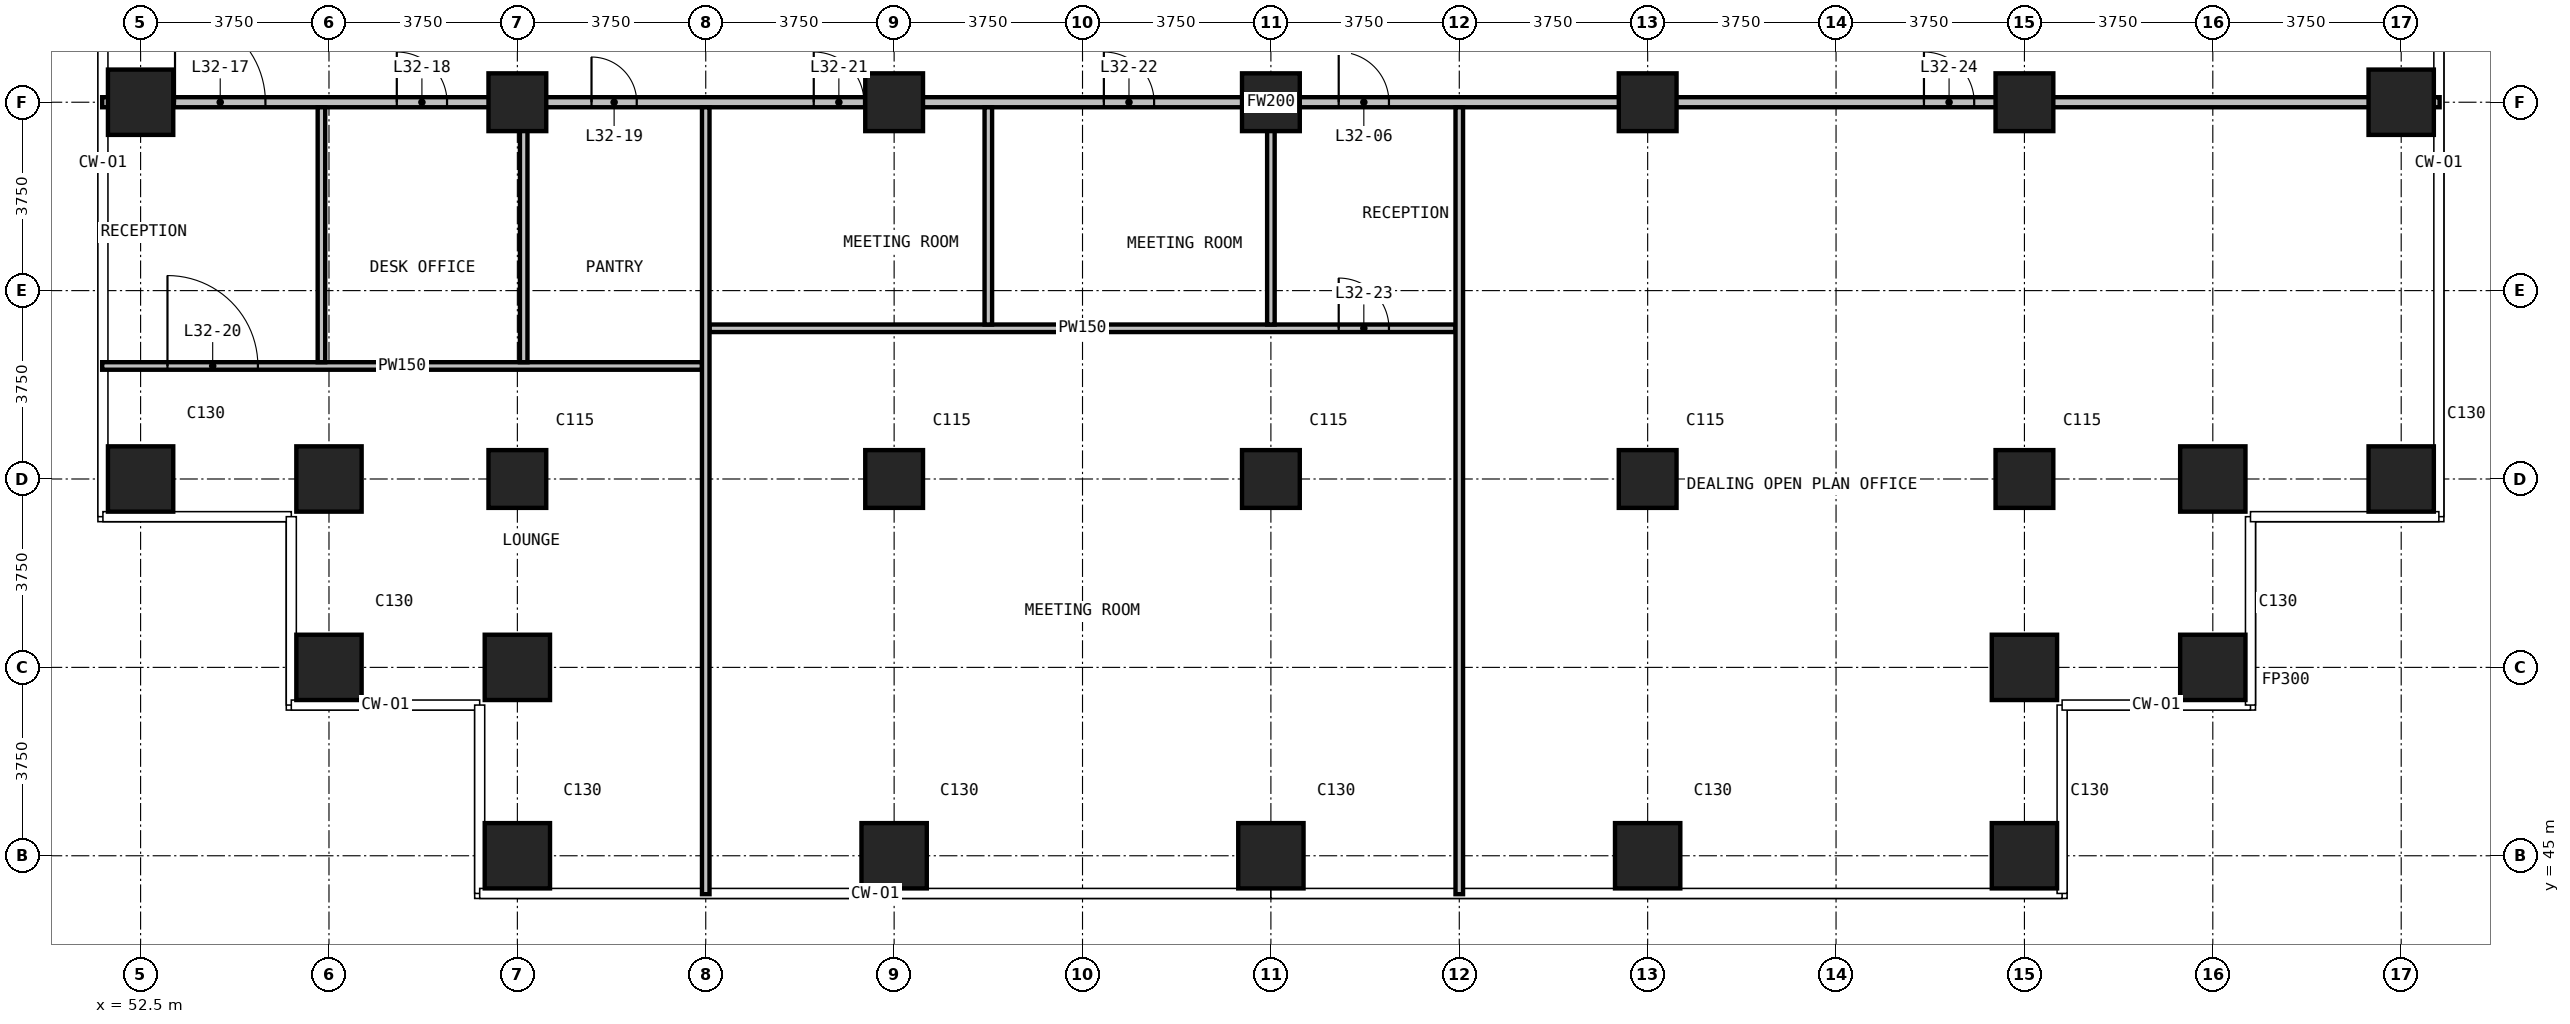
"""IFC4 building model, lengths in metres.
Left out: names, types, materials, properties, quantities, classifications, styles, units other than length and angle.
Written with IfcOpenShell. Run it as: python <this file> out.ifc"""

import sys

from ifc_helpers import new_model, si_unit, direction, frame, frame_2d, origin, origin_2d, place, context, subcontext, project, spatial, rectangle, extrude, element, fill, save


model = new_model("IFC4")
c1 = context("Model", 3, precision=1e-05, world=origin(), true_north=direction((0.0, 1.0)))
c2 = subcontext(c1, "Body", "Model", "MODEL_VIEW")
j1 = project(units=[si_unit("LENGTHUNIT", "METRE"), si_unit("PLANEANGLEUNIT", "RADIAN")], contexts=[c1])
p1 = place(None, origin())
s1 = spatial("IfcSite", under=j1, at=p1, CompositionType="ELEMENT")
p2 = place(p1, origin())
s2 = spatial("IfcBuilding", under=s1, at=p2, CompositionType="ELEMENT")
p3 = place(p2, frame((0.0, 0.0, 128.8)))
s3 = spatial("IfcBuildingStorey", under=s2, at=p3, CompositionType="ELEMENT", Elevation=128.8)
for number, where, z_axis, x_axis in (
    (1, (52.5, 52.5, 0.0), (0.0, 0.0, 1.0), (1.0, 0.0, 0.0)),
    (2, (52.5, 60.0, 0.0), (0.0, 0.0, 1.0), (1.0, 0.0, 0.0)),
    (3, (56.25, 48.75, 0.0), (0.0, 0.0, 1.0), (1.0, 0.0, 0.0)),
    (4, (56.25, 52.5, 0.0), (0.0, 0.0, 1.0), (1.0, 0.0, 0.0)),
    (5, (60.0, 45.0, 0.0), (0.0, 0.0, 1.0), (1.0, 0.0, 0.0)),
    (6, (60.0, 48.75, 0.0), (0.0, 0.0, 1.0), (1.0, 0.0, 0.0)),
):
    element("IfcColumn", number, at=place(p3, frame(where, z_axis=z_axis, x_axis=x_axis)), inside=s3, PredefinedType="COLUMN", context=c2, shape_type="SweptSolid", body=[
        extrude(rectangle(XDim=1.3, YDim=1.3, at=origin_2d()), origin(), (0.0, 0.0, 1.0), 3.6),
    ])
for number, where, z_axis, x_axis in (
    (7, (60.0, 52.5, 0.0), (0.0, 0.0, 1.0), (1.0, 0.0, 0.0)),
    (8, (60.0, 60.0, 0.0), (0.0, 0.0, 1.0), (1.0, 0.0, 0.0)),
):
    element("IfcColumn", number, at=place(p3, frame(where, z_axis=z_axis, x_axis=x_axis)), inside=s3, PredefinedType="COLUMN", context=c2, shape_type="SweptSolid", body=[
        extrude(rectangle(XDim=1.15, YDim=1.15, at=origin_2d()), origin(), (0.0, 0.0, 1.0), 3.6),
    ])
p4 = place(p3, frame((67.5, 45.0, 0.0), z_axis=(0.0, 0.0, 1.0), x_axis=(1.0, 0.0, 0.0)))
e9 = element("IfcColumn", 9, at=p4, inside=s3, PredefinedType="COLUMN", context=c2, shape_type="SweptSolid", body=[
    extrude(rectangle(XDim=1.3, YDim=1.3, at=origin_2d()), origin(), (0.0, 0.0, 1.0), 3.6),
])
for number, where, z_axis, x_axis in (
    (10, (67.5, 52.5, 0.0), (0.0, 0.0, 1.0), (1.0, 0.0, 0.0)),
    (11, (67.5, 60.0, 0.0), (0.0, 0.0, 1.0), (1.0, 0.0, 0.0)),
):
    element("IfcColumn", number, at=place(p3, frame(where, z_axis=z_axis, x_axis=x_axis)), inside=s3, PredefinedType="COLUMN", context=c2, shape_type="SweptSolid", body=[
        extrude(rectangle(XDim=1.15, YDim=1.15, at=origin_2d()), origin(), (0.0, 0.0, 1.0), 3.6),
    ])
p5 = place(p3, frame((75.0, 45.0, 0.0), z_axis=(0.0, 0.0, 1.0), x_axis=(1.0, 0.0, 0.0)))
e12 = element("IfcColumn", 12, at=p5, inside=s3, PredefinedType="COLUMN", context=c2, shape_type="SweptSolid", body=[
    extrude(rectangle(XDim=1.3, YDim=1.3, at=origin_2d()), origin(), (0.0, 0.0, 1.0), 3.6),
])
for number, where, z_axis, x_axis in (
    (13, (75.0, 52.5, 0.0), (0.0, 0.0, 1.0), (1.0, 0.0, 0.0)),
    (14, (75.0, 60.0, 0.0), (0.0, 0.0, 1.0), (1.0, 0.0, 0.0)),
):
    element("IfcColumn", number, at=place(p3, frame(where, z_axis=z_axis, x_axis=x_axis)), inside=s3, PredefinedType="COLUMN", context=c2, shape_type="SweptSolid", body=[
        extrude(rectangle(XDim=1.15, YDim=1.15, at=origin_2d()), origin(), (0.0, 0.0, 1.0), 3.6),
    ])
p6 = place(p3, frame((82.5, 45.0, 0.0), z_axis=(0.0, 0.0, 1.0), x_axis=(1.0, 0.0, 0.0)))
e15 = element("IfcColumn", 15, at=p6, inside=s3, PredefinedType="COLUMN", context=c2, shape_type="SweptSolid", body=[
    extrude(rectangle(XDim=1.3, YDim=1.3, at=origin_2d()), origin(), (0.0, 0.0, 1.0), 3.6),
])
for number, where, z_axis, x_axis in (
    (16, (82.5, 52.5, 0.0), (0.0, 0.0, 1.0), (1.0, 0.0, 0.0)),
    (17, (82.5, 60.0, 0.0), (0.0, 0.0, 1.0), (1.0, 0.0, 0.0)),
):
    element("IfcColumn", number, at=place(p3, frame(where, z_axis=z_axis, x_axis=x_axis)), inside=s3, PredefinedType="COLUMN", context=c2, shape_type="SweptSolid", body=[
        extrude(rectangle(XDim=1.15, YDim=1.15, at=origin_2d()), origin(), (0.0, 0.0, 1.0), 3.6),
    ])
for number, where, z_axis, x_axis in (
    (18, (90.0, 45.0, 0.0), (0.0, 0.0, 1.0), (1.0, 0.0, 0.0)),
    (19, (90.0, 48.75, 0.0), (0.0, 0.0, 1.0), (1.0, 0.0, 0.0)),
):
    element("IfcColumn", number, at=place(p3, frame(where, z_axis=z_axis, x_axis=x_axis)), inside=s3, PredefinedType="COLUMN", context=c2, shape_type="SweptSolid", body=[
        extrude(rectangle(XDim=1.3, YDim=1.3, at=origin_2d()), origin(), (0.0, 0.0, 1.0), 3.6),
    ])
for number, where, z_axis, x_axis in (
    (20, (90.0, 52.5, 0.0), (0.0, 0.0, 1.0), (1.0, 0.0, 0.0)),
    (21, (90.0, 60.0, 0.0), (0.0, 0.0, 1.0), (1.0, 0.0, 0.0)),
):
    element("IfcColumn", number, at=place(p3, frame(where, z_axis=z_axis, x_axis=x_axis)), inside=s3, PredefinedType="COLUMN", context=c2, shape_type="SweptSolid", body=[
        extrude(rectangle(XDim=1.15, YDim=1.15, at=origin_2d()), origin(), (0.0, 0.0, 1.0), 3.6),
    ])
for number, where, z_axis, x_axis in (
    (22, (93.75, 48.75, 0.0), (0.0, 0.0, 1.0), (1.0, 0.0, 0.0)),
    (23, (93.75, 52.5, 0.0), (0.0, 0.0, 1.0), (1.0, 0.0, 0.0)),
    (24, (97.5, 52.5, 0.0), (0.0, 0.0, 1.0), (1.0, 0.0, 0.0)),
    (25, (97.5, 60.0, 0.0), (0.0, 0.0, 1.0), (1.0, 0.0, 0.0)),
):
    element("IfcColumn", number, at=place(p3, frame(where, z_axis=z_axis, x_axis=x_axis)), inside=s3, PredefinedType="COLUMN", context=c2, shape_type="SweptSolid", body=[
        extrude(rectangle(XDim=1.3, YDim=1.3, at=origin_2d()), origin(), (0.0, 0.0, 1.0), 3.6),
    ])
p7 = place(p3, frame((51.735, 60.0, 0.0), z_axis=(0.0, 0.0, 1.0), x_axis=(1.0, 0.0, 0.0)))
e26 = element("IfcWall", 26, at=p7, inside=s3, PredefinedType="PARTITIONING", context=c2, shape_type="SweptSolid", body=[
    extrude(rectangle(XDim=46.53, YDim=0.2, at=frame_2d((23.265, 0.0))), origin(), (0.0, 0.0, 1.0), 3.3),
])
p8 = place(p7, frame((24.615, 0.0, 0.0)))
e27 = element("IfcOpeningElement", 27, at=p8, cuts=e26, PredefinedType="OPENING", context=c2, shape_type="SweptSolid", body=[
    extrude(rectangle(XDim=1.0, YDim=2.2, at=frame_2d((0.5, 1.1))), frame((0.0, 0.11, 0.0), z_axis=(0.0, -1.0, 0.0), x_axis=(1.0, 0.0, 0.0)), (0.0, 0.0, 1.0), 0.22),
])
p9 = place(p7, frame((1.45, 0.0, 0.0)))
e28 = element("IfcOpeningElement", 28, at=p9, cuts=e26, PredefinedType="OPENING", context=c2, shape_type="SweptSolid", body=[
    extrude(rectangle(XDim=1.8, YDim=2.2, at=frame_2d((0.9, 1.1))), frame((0.0, 0.11, 0.0), z_axis=(0.0, -1.0, 0.0), x_axis=(1.0, 0.0, 0.0)), (0.0, 0.0, 1.0), 0.22),
])
p10 = place(p7, frame((5.865, 0.0, 0.0)))
e29 = element("IfcOpeningElement", 29, at=p10, cuts=e26, PredefinedType="OPENING", context=c2, shape_type="SweptSolid", body=[
    extrude(rectangle(XDim=1.0, YDim=2.2, at=frame_2d((0.5, 1.1))), frame((0.0, 0.11, 0.0), z_axis=(0.0, -1.0, 0.0), x_axis=(1.0, 0.0, 0.0)), (0.0, 0.0, 1.0), 0.22),
])
p11 = place(p7, frame((9.741, 0.0, 0.0)))
e30 = element("IfcOpeningElement", 30, at=p11, cuts=e26, PredefinedType="OPENING", context=c2, shape_type="SweptSolid", body=[
    extrude(rectangle(XDim=0.9, YDim=2.2, at=frame_2d((0.45, 1.1))), frame((0.0, 0.11, 0.0), z_axis=(0.0, -1.0, 0.0), x_axis=(1.0, 0.0, 0.0)), (0.0, 0.0, 1.0), 0.22),
])
p12 = place(p7, frame((14.165, 0.0, 0.0)))
e31 = element("IfcOpeningElement", 31, at=p12, cuts=e26, PredefinedType="OPENING", context=c2, shape_type="SweptSolid", body=[
    extrude(rectangle(XDim=1.0, YDim=2.2, at=frame_2d((0.5, 1.1))), frame((0.0, 0.11, 0.0), z_axis=(0.0, -1.0, 0.0), x_axis=(1.0, 0.0, 0.0)), (0.0, 0.0, 1.0), 0.22),
])
p13 = place(p7, frame((19.94, 0.0, 0.0)))
e32 = element("IfcOpeningElement", 32, at=p13, cuts=e26, PredefinedType="OPENING", context=c2, shape_type="SweptSolid", body=[
    extrude(rectangle(XDim=1.0, YDim=2.2, at=frame_2d((0.5, 1.1))), frame((0.0, 0.11, 0.0), z_axis=(0.0, -1.0, 0.0), x_axis=(1.0, 0.0, 0.0)), (0.0, 0.0, 1.0), 0.22),
])
p14 = place(p7, frame((36.265, 0.0, 0.0)))
e33 = element("IfcOpeningElement", 33, at=p14, cuts=e26, PredefinedType="OPENING", context=c2, shape_type="SweptSolid", body=[
    extrude(rectangle(XDim=1.0, YDim=2.2, at=frame_2d((0.5, 1.1))), frame((0.0, 0.11, 0.0), z_axis=(0.0, -1.0, 0.0), x_axis=(1.0, 0.0, 0.0)), (0.0, 0.0, 1.0), 0.22),
])
p15 = place(p3, frame((51.735, 54.75, 0.0), z_axis=(0.0, 0.0, 1.0), x_axis=(1.0, 0.0, 0.0)))
e34 = element("IfcWall", 34, at=p15, inside=s3, PredefinedType="PARTITIONING", context=c2, shape_type="SweptSolid", body=[
    extrude(rectangle(XDim=11.94, YDim=0.15, at=frame_2d((5.97, 0.0))), origin(), (0.0, 0.0, 1.0), 3.3),
])
p16 = place(p15, frame((1.3, 0.0, 0.0)))
e35 = element("IfcOpeningElement", 35, at=p16, cuts=e34, PredefinedType="OPENING", context=c2, shape_type="SweptSolid", body=[
    extrude(rectangle(XDim=1.8, YDim=2.2, at=frame_2d((0.9, 1.1))), frame((0.0, 0.085, 0.0), z_axis=(0.0, -1.0, 0.0), x_axis=(1.0, 0.0, 0.0)), (0.0, 0.0, 1.0), 0.17),
])
p17 = place(p3, frame((63.825, 55.5, 0.0), z_axis=(0.0, 0.0, 1.0), x_axis=(1.0, 0.0, 0.0)))
e36 = element("IfcWall", 36, at=p17, inside=s3, PredefinedType="PARTITIONING", context=c2, shape_type="SweptSolid", body=[
    extrude(rectangle(XDim=14.85, YDim=0.15, at=frame_2d((7.425, 0.0))), origin(), (0.0, 0.0, 1.0), 3.3),
])
p18 = place(p17, frame((12.525, 0.0, 0.0)))
e37 = element("IfcOpeningElement", 37, at=p18, cuts=e36, PredefinedType="OPENING", context=c2, shape_type="SweptSolid", body=[
    extrude(rectangle(XDim=1.0, YDim=2.2, at=frame_2d((0.5, 1.1))), frame((0.0, 0.085, 0.0), z_axis=(0.0, -1.0, 0.0), x_axis=(1.0, 0.0, 0.0)), (0.0, 0.0, 1.0), 0.17),
])
for number, where, z_axis, x_axis in (
    (38, (56.1, 54.825, 0.0), (0.0, 0.0, 1.0), (0.0, 1.0, 0.0)),
    (39, (60.126, 54.825, 0.0), (0.0, 0.0, 1.0), (0.0, 1.0, 0.0)),
):
    element("IfcWall", number, at=place(p3, frame(where, z_axis=z_axis, x_axis=x_axis)), inside=s3, PredefinedType="PARTITIONING", context=c2, shape_type="SweptSolid", body=[
        extrude(rectangle(XDim=5.075, YDim=0.15, at=frame_2d((2.538, 0.0))), origin(), (0.0, 0.0, 1.0), 3.3),
    ])
p19 = place(p3, frame((63.75, 44.235, 0.0), z_axis=(0.0, 0.0, 1.0), x_axis=(0.0, 1.0, 0.0)))
e40 = element("IfcWall", 40, at=p19, inside=s3, PredefinedType="PARTITIONING", context=c2, shape_type="SweptSolid", body=[
    extrude(rectangle(XDim=15.665, YDim=0.15, at=frame_2d((7.833, 0.0))), origin(), (0.0, 0.0, 1.0), 3.3),
])
for number, where, z_axis, x_axis in (
    (41, (69.375, 55.575, 0.0), (0.0, 0.0, 1.0), (0.0, 1.0, 0.0)),
    (42, (75.0, 55.575, 0.0), (0.0, 0.0, 1.0), (0.0, 1.0, 0.0)),
):
    element("IfcWall", number, at=place(p3, frame(where, z_axis=z_axis, x_axis=x_axis)), inside=s3, PredefinedType="PARTITIONING", context=c2, shape_type="SweptSolid", body=[
        extrude(rectangle(XDim=4.325, YDim=0.15, at=frame_2d((2.163, 0.0))), origin(), (0.0, 0.0, 1.0), 3.3),
    ])
p20 = place(p3, frame((78.75, 44.235, 0.0), z_axis=(0.0, 0.0, 1.0), x_axis=(0.0, 1.0, 0.0)))
e43 = element("IfcWall", 43, at=p20, inside=s3, PredefinedType="PARTITIONING", context=c2, shape_type="SweptSolid", body=[
    extrude(rectangle(XDim=15.665, YDim=0.15, at=frame_2d((7.833, 0.0))), origin(), (0.0, 0.0, 1.0), 3.3),
])
p21 = place(p8, origin())
e44 = element("IfcDoor", 44, at=p21, inside=s3, OperationType="SINGLE_SWING_RIGHT", PredefinedType="DOOR", context=c2, shape_type="SweptSolid", body=[
    extrude(rectangle(XDim=1.0, YDim=2.2, at=frame_2d((0.5, 1.1))), frame((0.0, 0.025, 0.0), z_axis=(0.0, -1.0, 0.0), x_axis=(1.0, 0.0, 0.0)), (0.0, 0.0, 1.0), 0.05),
])
fill(e27, e44)
p22 = place(p9, origin())
e45 = element("IfcDoor", 45, at=p22, inside=s3, OperationType="DOUBLE_DOOR_SINGLE_SWING", PredefinedType="DOOR", context=c2, shape_type="SweptSolid", body=[
    extrude(rectangle(XDim=1.8, YDim=2.2, at=frame_2d((0.9, 1.1))), frame((0.0, 0.025, 0.0), z_axis=(0.0, -1.0, 0.0), x_axis=(1.0, 0.0, 0.0)), (0.0, 0.0, 1.0), 0.05),
])
fill(e28, e45)
p23 = place(p10, origin())
e46 = element("IfcDoor", 46, at=p23, inside=s3, OperationType="SINGLE_SWING_LEFT", PredefinedType="DOOR", context=c2, shape_type="SweptSolid", body=[
    extrude(rectangle(XDim=1.0, YDim=2.2, at=frame_2d((0.5, 1.1))), frame((0.0, 0.025, 0.0), z_axis=(0.0, -1.0, 0.0), x_axis=(1.0, 0.0, 0.0)), (0.0, 0.0, 1.0), 0.05),
])
fill(e29, e46)
p24 = place(p11, origin())
e47 = element("IfcDoor", 47, at=p24, inside=s3, OperationType="SINGLE_SWING_LEFT", PredefinedType="DOOR", context=c2, shape_type="SweptSolid", body=[
    extrude(rectangle(XDim=0.9, YDim=2.2, at=frame_2d((0.45, 1.1))), frame((0.0, 0.025, 0.0), z_axis=(0.0, -1.0, 0.0), x_axis=(1.0, 0.0, 0.0)), (0.0, 0.0, 1.0), 0.05),
])
fill(e30, e47)
p25 = place(p16, origin())
e48 = element("IfcDoor", 48, at=p25, inside=s3, OperationType="DOUBLE_DOOR_SINGLE_SWING", PredefinedType="DOOR", context=c2, shape_type="SweptSolid", body=[
    extrude(rectangle(XDim=1.8, YDim=2.2, at=frame_2d((0.9, 1.1))), frame((0.0, 0.025, 0.0), z_axis=(0.0, -1.0, 0.0), x_axis=(1.0, 0.0, 0.0)), (0.0, 0.0, 1.0), 0.05),
])
fill(e35, e48)
p26 = place(p12, origin())
e49 = element("IfcDoor", 49, at=p26, inside=s3, OperationType="SINGLE_SWING_LEFT", PredefinedType="DOOR", context=c2, shape_type="SweptSolid", body=[
    extrude(rectangle(XDim=1.0, YDim=2.2, at=frame_2d((0.5, 1.1))), frame((0.0, 0.025, 0.0), z_axis=(0.0, -1.0, 0.0), x_axis=(1.0, 0.0, 0.0)), (0.0, 0.0, 1.0), 0.05),
])
fill(e31, e49)
p27 = place(p13, origin())
e50 = element("IfcDoor", 50, at=p27, inside=s3, OperationType="SINGLE_SWING_LEFT", PredefinedType="DOOR", context=c2, shape_type="SweptSolid", body=[
    extrude(rectangle(XDim=1.0, YDim=2.2, at=frame_2d((0.5, 1.1))), frame((0.0, 0.025, 0.0), z_axis=(0.0, -1.0, 0.0), x_axis=(1.0, 0.0, 0.0)), (0.0, 0.0, 1.0), 0.05),
])
fill(e32, e50)
p28 = place(p18, origin())
e51 = element("IfcDoor", 51, at=p28, inside=s3, OperationType="SINGLE_SWING_LEFT", PredefinedType="DOOR", context=c2, shape_type="SweptSolid", body=[
    extrude(rectangle(XDim=1.0, YDim=2.2, at=frame_2d((0.5, 1.1))), frame((0.0, 0.025, 0.0), z_axis=(0.0, -1.0, 0.0), x_axis=(1.0, 0.0, 0.0)), (0.0, 0.0, 1.0), 0.05),
])
fill(e37, e51)
p29 = place(p14, origin())
e52 = element("IfcDoor", 52, at=p29, inside=s3, OperationType="SINGLE_SWING_RIGHT", PredefinedType="DOOR", context=c2, shape_type="SweptSolid", body=[
    extrude(rectangle(XDim=1.0, YDim=2.2, at=frame_2d((0.5, 1.1))), frame((0.0, 0.025, 0.0), z_axis=(0.0, -1.0, 0.0), x_axis=(1.0, 0.0, 0.0)), (0.0, 0.0, 1.0), 0.05),
])
fill(e33, e52)
save(model, sys.argv[1])
